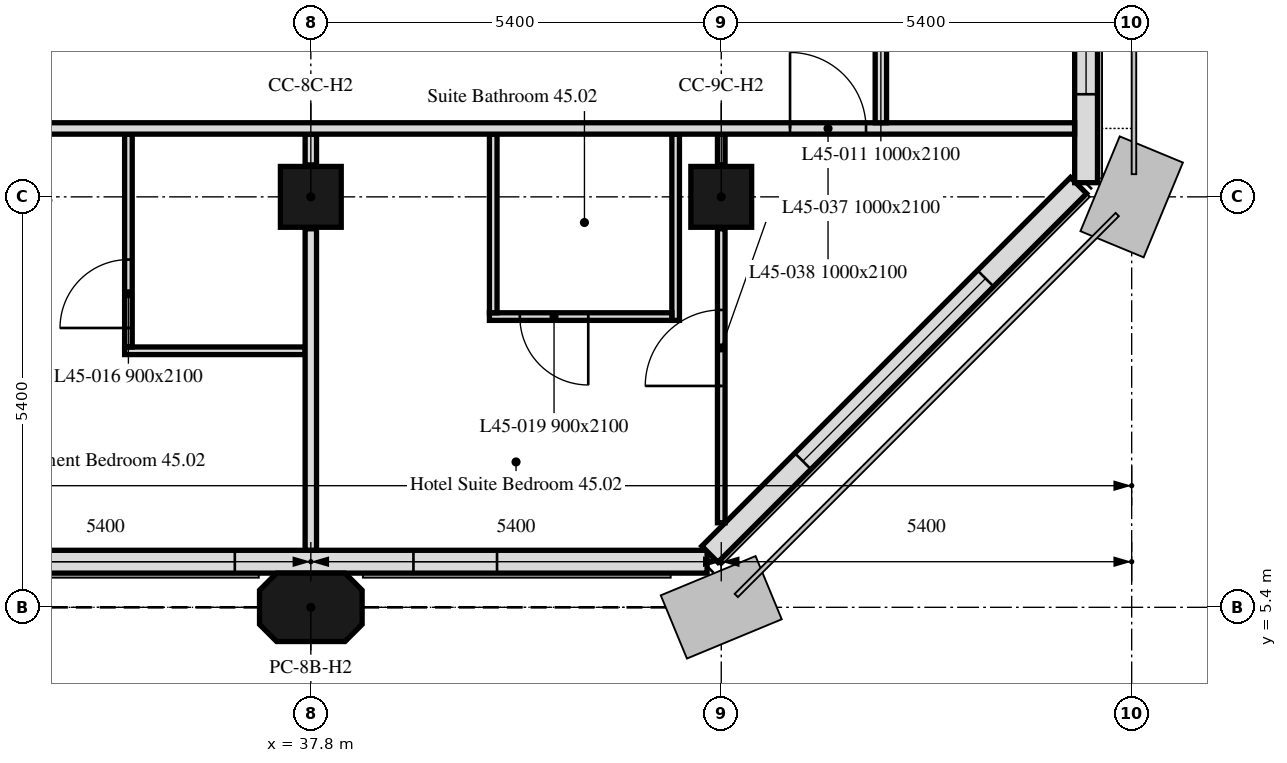
"""IFC4 building model, lengths in metres.
Left out: names, types, materials, properties, quantities, classifications, styles, units other than length and angle.
Written with IfcOpenShell. Run it as: python <this file> out.ifc"""

import sys

from ifc_helpers import new_model, si_unit, direction, frame, frame_2d, origin, origin_2d, place, context, subcontext, project, spatial, polyline, rectangle, outline, extrude, element, fill, save


model = new_model("IFC4")
c1 = context("Model", 3, precision=1e-05, world=origin(), true_north=direction((0.0, 1.0)))
c2 = subcontext(c1, "Body", "Model", "MODEL_VIEW")
j1 = project(units=[si_unit("LENGTHUNIT", "METRE"), si_unit("PLANEANGLEUNIT", "RADIAN")], contexts=[c1])
p1 = place(None, origin())
s1 = spatial("IfcSite", under=j1, at=p1, CompositionType="ELEMENT")
p2 = place(p1, origin())
s2 = spatial("IfcBuilding", under=s1, at=p2, CompositionType="ELEMENT")
p3 = place(p2, frame((0.0, 0.0, 187.3)))
s3 = spatial("IfcBuildingStorey", under=s2, at=p3, CompositionType="ELEMENT", Elevation=187.3)
p4 = place(p3, frame((37.8, 5.4, 0.0), z_axis=(0.0, 0.0, 1.0), x_axis=(1.0, 0.0, 0.0)))
e1 = element("IfcColumn", 1, at=p4, inside=s3, PredefinedType="COLUMN", context=c2, shape_type="SweptSolid", body=[
    extrude(outline(polyline([(-0.45, -0.45), (0.45, -0.45), (0.675, -0.225), (0.675, 0.225), (0.45, 0.45), (-0.45, 0.45), (-0.675, 0.225), (-0.675, -0.225), (-0.45, -0.45)])), origin(), (0.0, 0.0, 1.0), 3.0),
])
for number, where, z_axis, x_axis in (
    (2, (37.8, 10.8, 0.0), (0.0, 0.0, 1.0), (1.0, 0.0, 0.0)),
    (3, (43.2, 10.8, 0.0), (0.0, 0.0, 1.0), (1.0, 0.0, 0.0)),
):
    element("IfcColumn", number, at=place(p3, frame(where, z_axis=z_axis, x_axis=x_axis)), inside=s3, PredefinedType="COLUMN", context=c2, shape_type="SweptSolid", body=[
        extrude(rectangle(XDim=0.8, YDim=0.8, at=origin_2d()), origin(), (0.0, 0.0, 1.0), 3.0),
    ])
p5 = place(p3, frame((10.986, 6.0, 0.0), z_axis=(0.0, 0.0, 1.0), x_axis=(1.0, 0.0, 0.0)))
e4 = element("IfcWall", 4, at=p5, inside=s3, PredefinedType="SOLIDWALL", context=c2, shape_type="SweptSolid", body=[
    extrude(rectangle(XDim=32.027, YDim=0.3, at=frame_2d((16.014, 0.0))), origin(), (0.0, 0.0, 1.0), 3.0),
])
p6 = place(p5, frame((0.814, 0.0, 0.9)))
e5 = element("IfcOpeningElement", 5, at=p6, cuts=e4, PredefinedType="OPENING", context=c2, shape_type="SweptSolid", body=[
    extrude(rectangle(XDim=3.4, YDim=1.7, at=frame_2d((1.7, 0.85))), frame((0.0, 0.16, 0.0), z_axis=(0.0, -1.0, 0.0), x_axis=(1.0, 0.0, 0.0)), (0.0, 0.0, 1.0), 0.32),
])
p7 = place(p5, frame((7.464, 0.0, 0.9)))
e6 = element("IfcOpeningElement", 6, at=p7, cuts=e4, PredefinedType="OPENING", context=c2, shape_type="SweptSolid", body=[
    extrude(rectangle(XDim=1.1, YDim=1.7, at=frame_2d((0.55, 0.85))), frame((0.0, 0.16, 0.0), z_axis=(0.0, -1.0, 0.0), x_axis=(1.0, 0.0, 0.0)), (0.0, 0.0, 1.0), 0.32),
])
p8 = place(p5, frame((11.614, 0.0, 0.9)))
e7 = element("IfcOpeningElement", 7, at=p8, cuts=e4, PredefinedType="OPENING", context=c2, shape_type="SweptSolid", body=[
    extrude(rectangle(XDim=3.4, YDim=1.7, at=frame_2d((1.7, 0.85))), frame((0.0, 0.16, 0.0), z_axis=(0.0, -1.0, 0.0), x_axis=(1.0, 0.0, 0.0)), (0.0, 0.0, 1.0), 0.32),
])
p9 = place(p5, frame((18.264, 0.0, 0.9)))
e8 = element("IfcOpeningElement", 8, at=p9, cuts=e4, PredefinedType="OPENING", context=c2, shape_type="SweptSolid", body=[
    extrude(rectangle(XDim=1.1, YDim=1.7, at=frame_2d((0.55, 0.85))), frame((0.0, 0.16, 0.0), z_axis=(0.0, -1.0, 0.0), x_axis=(1.0, 0.0, 0.0)), (0.0, 0.0, 1.0), 0.32),
])
p10 = place(p5, frame((22.414, 0.0, 0.9)))
e9 = element("IfcOpeningElement", 9, at=p10, cuts=e4, PredefinedType="OPENING", context=c2, shape_type="SweptSolid", body=[
    extrude(rectangle(XDim=3.4, YDim=1.7, at=frame_2d((1.7, 0.85))), frame((0.0, 0.16, 0.0), z_axis=(0.0, -1.0, 0.0), x_axis=(1.0, 0.0, 0.0)), (0.0, 0.0, 1.0), 0.32),
])
p11 = place(p5, frame((28.164, 0.0, 0.9)))
e10 = element("IfcOpeningElement", 10, at=p11, cuts=e4, PredefinedType="OPENING", context=c2, shape_type="SweptSolid", body=[
    extrude(rectangle(XDim=1.1, YDim=1.7, at=frame_2d((0.55, 0.85))), frame((0.0, 0.16, 0.0), z_axis=(0.0, -1.0, 0.0), x_axis=(1.0, 0.0, 0.0)), (0.0, 0.0, 1.0), 0.32),
])
p12 = place(p3, frame((43.051, 6.099, 0.0), z_axis=(0.0, 0.0, 1.0), x_axis=(0.707106781187, 0.707106781187, 0.0)))
e11 = element("IfcWall", 11, at=p12, inside=s3, PredefinedType="SOLIDWALL", context=c2, shape_type="SweptSolid", body=[
    extrude(rectangle(XDim=6.86, YDim=0.3, at=frame_2d((3.43, 0.0))), origin(), (0.0, 0.0, 1.0), 3.0),
])
p13 = place(p12, frame((1.73, 0.0, 0.9)))
e12 = element("IfcOpeningElement", 12, at=p13, cuts=e11, PredefinedType="OPENING", context=c2, shape_type="SweptSolid", body=[
    extrude(rectangle(XDim=3.4, YDim=1.7, at=frame_2d((1.7, 0.85))), frame((0.0, 0.16, 0.0), z_axis=(0.0, -1.0, 0.0), x_axis=(1.0, 0.0, 0.0)), (0.0, 0.0, 1.0), 0.32),
])
p14 = place(p3, frame((48.0, 10.986, 0.0), z_axis=(0.0, 0.0, 1.0), x_axis=(0.0, 1.0, 0.0)))
e13 = element("IfcWall", 13, at=p14, inside=s3, PredefinedType="SOLIDWALL", context=c2, shape_type="SweptSolid", body=[
    extrude(rectangle(XDim=32.027, YDim=0.3, at=frame_2d((16.014, 0.0))), origin(), (0.0, 0.0, 1.0), 3.0),
])
p15 = place(p14, frame((1.164, 0.0, 0.9)))
e14 = element("IfcOpeningElement", 14, at=p15, cuts=e13, PredefinedType="OPENING", context=c2, shape_type="SweptSolid", body=[
    extrude(rectangle(XDim=1.1, YDim=1.7, at=frame_2d((0.55, 0.85))), frame((0.0, 0.16, 0.0), z_axis=(0.0, -1.0, 0.0), x_axis=(1.0, 0.0, 0.0)), (0.0, 0.0, 1.0), 0.32),
])
p16 = place(p14, frame((2.764, 0.0, 0.9)))
e15 = element("IfcOpeningElement", 15, at=p16, cuts=e13, PredefinedType="OPENING", context=c2, shape_type="SweptSolid", body=[
    extrude(rectangle(XDim=1.1, YDim=1.7, at=frame_2d((0.55, 0.85))), frame((0.0, 0.16, 0.0), z_axis=(0.0, -1.0, 0.0), x_axis=(1.0, 0.0, 0.0)), (0.0, 0.0, 1.0), 0.32),
])
p17 = place(p14, frame((6.564, 0.0, 0.9)))
e16 = element("IfcOpeningElement", 16, at=p17, cuts=e13, PredefinedType="OPENING", context=c2, shape_type="SweptSolid", body=[
    extrude(rectangle(XDim=1.1, YDim=1.7, at=frame_2d((0.55, 0.85))), frame((0.0, 0.16, 0.0), z_axis=(0.0, -1.0, 0.0), x_axis=(1.0, 0.0, 0.0)), (0.0, 0.0, 1.0), 0.32),
])
p18 = place(p14, frame((8.164, 0.0, 0.9)))
e17 = element("IfcOpeningElement", 17, at=p18, cuts=e13, PredefinedType="OPENING", context=c2, shape_type="SweptSolid", body=[
    extrude(rectangle(XDim=1.1, YDim=1.7, at=frame_2d((0.55, 0.85))), frame((0.0, 0.16, 0.0), z_axis=(0.0, -1.0, 0.0), x_axis=(1.0, 0.0, 0.0)), (0.0, 0.0, 1.0), 0.32),
])
p19 = place(p14, frame((11.964, 0.0, 0.9)))
e18 = element("IfcOpeningElement", 18, at=p19, cuts=e13, PredefinedType="OPENING", context=c2, shape_type="SweptSolid", body=[
    extrude(rectangle(XDim=1.1, YDim=1.7, at=frame_2d((0.55, 0.85))), frame((0.0, 0.16, 0.0), z_axis=(0.0, -1.0, 0.0), x_axis=(1.0, 0.0, 0.0)), (0.0, 0.0, 1.0), 0.32),
])
p20 = place(p14, frame((13.564, 0.0, 0.9)))
e19 = element("IfcOpeningElement", 19, at=p20, cuts=e13, PredefinedType="OPENING", context=c2, shape_type="SweptSolid", body=[
    extrude(rectangle(XDim=1.1, YDim=1.7, at=frame_2d((0.55, 0.85))), frame((0.0, 0.16, 0.0), z_axis=(0.0, -1.0, 0.0), x_axis=(1.0, 0.0, 0.0)), (0.0, 0.0, 1.0), 0.32),
])
p21 = place(p14, frame((17.364, 0.0, 0.9)))
e20 = element("IfcOpeningElement", 20, at=p21, cuts=e13, PredefinedType="OPENING", context=c2, shape_type="SweptSolid", body=[
    extrude(rectangle(XDim=1.1, YDim=1.7, at=frame_2d((0.55, 0.85))), frame((0.0, 0.16, 0.0), z_axis=(0.0, -1.0, 0.0), x_axis=(1.0, 0.0, 0.0)), (0.0, 0.0, 1.0), 0.32),
])
p22 = place(p14, frame((18.964, 0.0, 0.9)))
e21 = element("IfcOpeningElement", 21, at=p22, cuts=e13, PredefinedType="OPENING", context=c2, shape_type="SweptSolid", body=[
    extrude(rectangle(XDim=1.1, YDim=1.7, at=frame_2d((0.55, 0.85))), frame((0.0, 0.16, 0.0), z_axis=(0.0, -1.0, 0.0), x_axis=(1.0, 0.0, 0.0)), (0.0, 0.0, 1.0), 0.32),
])
p23 = place(p14, frame((22.414, 0.0, 0.9)))
e22 = element("IfcOpeningElement", 22, at=p23, cuts=e13, PredefinedType="OPENING", context=c2, shape_type="SweptSolid", body=[
    extrude(rectangle(XDim=3.4, YDim=1.7, at=frame_2d((1.7, 0.85))), frame((0.0, 0.16, 0.0), z_axis=(0.0, -1.0, 0.0), x_axis=(1.0, 0.0, 0.0)), (0.0, 0.0, 1.0), 0.32),
])
p24 = place(p14, frame((28.164, 0.0, 0.9)))
e23 = element("IfcOpeningElement", 23, at=p24, cuts=e13, PredefinedType="OPENING", context=c2, shape_type="SweptSolid", body=[
    extrude(rectangle(XDim=1.1, YDim=1.7, at=frame_2d((0.55, 0.85))), frame((0.0, 0.16, 0.0), z_axis=(0.0, -1.0, 0.0), x_axis=(1.0, 0.0, 0.0)), (0.0, 0.0, 1.0), 0.32),
])
p25 = place(p14, frame((29.764, 0.0, 0.9)))
e24 = element("IfcOpeningElement", 24, at=p25, cuts=e13, PredefinedType="OPENING", context=c2, shape_type="SweptSolid", body=[
    extrude(rectangle(XDim=1.1, YDim=1.7, at=frame_2d((0.55, 0.85))), frame((0.0, 0.16, 0.0), z_axis=(0.0, -1.0, 0.0), x_axis=(1.0, 0.0, 0.0)), (0.0, 0.0, 1.0), 0.32),
])
p26 = place(p3, frame((37.725, 8.775, 0.0), z_axis=(0.0, 0.0, 1.0), x_axis=(-1.0, 0.0, 0.0)))
e25 = element("IfcWall", 25, at=p26, inside=s3, PredefinedType="PARTITIONING", context=c2, shape_type="SweptSolid", body=[
    extrude(rectangle(XDim=2.375, YDim=0.1, at=frame_2d((1.188, 0.0))), origin(), (0.0, 0.0, 1.0), 3.0),
])
p27 = place(p3, frame((35.4, 8.825, 0.0), z_axis=(0.0, 0.0, 1.0), x_axis=(0.0, 1.0, 0.0)))
e26 = element("IfcWall", 26, at=p27, inside=s3, PredefinedType="PARTITIONING", context=c2, shape_type="SweptSolid", body=[
    extrude(rectangle(XDim=2.8, YDim=0.1, at=frame_2d((1.4, 0.0))), origin(), (0.0, 0.0, 1.0), 3.0),
])
p28 = place(p27, frame((0.25, 0.0, 0.0)))
e27 = element("IfcOpeningElement", 27, at=p28, cuts=e26, PredefinedType="OPENING", context=c2, shape_type="SweptSolid", body=[
    extrude(rectangle(XDim=0.9, YDim=2.1, at=frame_2d((0.45, 1.05))), frame((0.0, 0.05, 0.0), z_axis=(0.0, -1.0, 0.0), x_axis=(1.0, 0.0, 0.0)), (0.0, 0.0, 1.0), 0.1),
])
p29 = place(p3, frame((37.8, 6.151, 0.0), z_axis=(0.0, 0.0, 1.0), x_axis=(0.0, 1.0, 0.0)))
e28 = element("IfcWall", 28, at=p29, inside=s3, PredefinedType="PARTITIONING", context=c2, shape_type="SweptSolid", body=[
    extrude(rectangle(XDim=4.229, YDim=0.15, at=frame_2d((2.115, 0.0))), origin(), (0.0, 0.0, 1.0), 3.0),
])
p30 = place(p3, frame((37.8, 11.22, 0.0), z_axis=(0.0, 0.0, 1.0), x_axis=(0.0, 1.0, 0.0)))
e29 = element("IfcWall", 29, at=p30, inside=s3, PredefinedType="PARTITIONING", context=c2, shape_type="SweptSolid", body=[
    extrude(rectangle(XDim=0.405, YDim=0.15, at=frame_2d((0.203, 0.0))), origin(), (0.0, 0.0, 1.0), 3.0),
])
p31 = place(p3, frame((43.2, 6.512, 0.0), z_axis=(0.0, 0.0, 1.0), x_axis=(0.0, 1.0, 0.0)))
e30 = element("IfcWall", 30, at=p31, inside=s3, PredefinedType="PARTITIONING", context=c2, shape_type="SweptSolid", body=[
    extrude(rectangle(XDim=3.868, YDim=0.1, at=frame_2d((1.934, 0.0))), origin(), (0.0, 0.0, 1.0), 3.0),
])
p32 = place(p31, frame((1.8, 0.0, 0.0)))
e31 = element("IfcOpeningElement", 31, at=p32, cuts=e30, PredefinedType="OPENING", context=c2, shape_type="SweptSolid", body=[
    extrude(rectangle(XDim=1.0, YDim=2.1, at=frame_2d((0.5, 1.05))), frame((0.0, 0.05, 0.0), z_axis=(0.0, -1.0, 0.0), x_axis=(1.0, 0.0, 0.0)), (0.0, 0.0, 1.0), 0.1),
])
p33 = place(p3, frame((43.2, 11.22, 0.0), z_axis=(0.0, 0.0, 1.0), x_axis=(0.0, 1.0, 0.0)))
e32 = element("IfcWall", 32, at=p33, inside=s3, PredefinedType="PARTITIONING", context=c2, shape_type="SweptSolid", body=[
    extrude(rectangle(XDim=0.405, YDim=0.1, at=frame_2d((0.203, 0.0))), origin(), (0.0, 0.0, 1.0), 3.0),
])
p34 = place(p3, frame((42.6, 11.625, 0.0), z_axis=(0.0, 0.0, 1.0), x_axis=(0.0, -1.0, 0.0)))
e33 = element("IfcWall", 33, at=p34, inside=s3, PredefinedType="PARTITIONING", context=c2, shape_type="SweptSolid", body=[
    extrude(rectangle(XDim=2.45, YDim=0.1, at=frame_2d((1.225, 0.0))), origin(), (0.0, 0.0, 1.0), 3.0),
])
p35 = place(p3, frame((42.55, 9.225, 0.0), z_axis=(0.0, 0.0, 1.0), x_axis=(-1.0, 0.0, 0.0)))
e34 = element("IfcWall", 34, at=p35, inside=s3, PredefinedType="PARTITIONING", context=c2, shape_type="SweptSolid", body=[
    extrude(rectangle(XDim=2.4, YDim=0.1, at=frame_2d((1.2, 0.0))), origin(), (0.0, 0.0, 1.0), 3.0),
])
p36 = place(p35, frame((1.1, 0.0, 0.0)))
e35 = element("IfcOpeningElement", 35, at=p36, cuts=e34, PredefinedType="OPENING", context=c2, shape_type="SweptSolid", body=[
    extrude(rectangle(XDim=0.9, YDim=2.1, at=frame_2d((0.45, 1.05))), frame((0.0, 0.05, 0.0), z_axis=(0.0, -1.0, 0.0), x_axis=(1.0, 0.0, 0.0)), (0.0, 0.0, 1.0), 0.1),
])
p37 = place(p3, frame((40.2, 9.275, 0.0), z_axis=(0.0, 0.0, 1.0), x_axis=(0.0, 1.0, 0.0)))
e36 = element("IfcWall", 36, at=p37, inside=s3, PredefinedType="PARTITIONING", context=c2, shape_type="SweptSolid", body=[
    extrude(rectangle(XDim=2.35, YDim=0.1, at=frame_2d((1.175, 0.0))), origin(), (0.0, 0.0, 1.0), 3.0),
])
p38 = place(p3, frame((6.151, 11.7, 0.0), z_axis=(0.0, 0.0, 1.0), x_axis=(1.0, 0.0, 0.0)))
e37 = element("IfcWall", 37, at=p38, inside=s3, PredefinedType="PARTITIONING", context=c2, shape_type="SweptSolid", body=[
    extrude(rectangle(XDim=41.698, YDim=0.15, at=frame_2d((20.849, 0.0))), origin(), (0.0, 0.0, 1.0), 3.0),
])
p39 = place(p38, frame((1.449, 0.0, 0.0)))
e38 = element("IfcOpeningElement", 38, at=p39, cuts=e37, PredefinedType="OPENING", context=c2, shape_type="SweptSolid", body=[
    extrude(rectangle(XDim=1.0, YDim=2.1, at=frame_2d((0.5, 1.05))), frame((0.0, 0.075, 0.0), z_axis=(0.0, -1.0, 0.0), x_axis=(1.0, 0.0, 0.0)), (0.0, 0.0, 1.0), 0.15),
])
p40 = place(p38, frame((37.954, 0.0, 0.0)))
e39 = element("IfcOpeningElement", 39, at=p40, cuts=e37, PredefinedType="OPENING", context=c2, shape_type="SweptSolid", body=[
    extrude(rectangle(XDim=1.0, YDim=2.1, at=frame_2d((0.5, 1.05))), frame((0.0, 0.075, 0.0), z_axis=(0.0, -1.0, 0.0), x_axis=(1.0, 0.0, 0.0)), (0.0, 0.0, 1.0), 0.15),
])
p41 = place(p38, frame((12.449, 0.0, 0.0)))
e40 = element("IfcOpeningElement", 40, at=p41, cuts=e37, PredefinedType="OPENING", context=c2, shape_type="SweptSolid", body=[
    extrude(rectangle(XDim=1.0, YDim=2.1, at=frame_2d((0.5, 1.05))), frame((0.0, 0.075, 0.0), z_axis=(0.0, -1.0, 0.0), x_axis=(1.0, 0.0, 0.0)), (0.0, 0.0, 1.0), 0.15),
])
p42 = place(p38, frame((23.249, 0.0, 0.0)))
e41 = element("IfcOpeningElement", 41, at=p42, cuts=e37, PredefinedType="OPENING", context=c2, shape_type="SweptSolid", body=[
    extrude(rectangle(XDim=1.0, YDim=2.1, at=frame_2d((0.5, 1.05))), frame((0.0, 0.075, 0.0), z_axis=(0.0, -1.0, 0.0), x_axis=(1.0, 0.0, 0.0)), (0.0, 0.0, 1.0), 0.15),
])
p43 = place(p3, frame((45.3, 40.425, 0.0), z_axis=(0.0, 0.0, 1.0), x_axis=(0.0, -1.0, 0.0)))
e42 = element("IfcWall", 42, at=p43, inside=s3, PredefinedType="PARTITIONING", context=c2, shape_type="SweptSolid", body=[
    extrude(rectangle(XDim=28.65, YDim=0.15, at=frame_2d((14.325, 0.0))), origin(), (0.0, 0.0, 1.0), 2.4),
])
p44 = place(p43, frame((10.225, 0.0, 0.0)))
e43 = element("IfcOpeningElement", 43, at=p44, cuts=e42, PredefinedType="OPENING", context=c2, shape_type="SweptSolid", body=[
    extrude(rectangle(XDim=1.0, YDim=2.1, at=frame_2d((0.5, 1.05))), frame((0.0, 0.075, 0.0), z_axis=(0.0, -1.0, 0.0), x_axis=(1.0, 0.0, 0.0)), (0.0, 0.0, 1.0), 0.15),
])
p45 = place(p43, frame((25.975, 0.0, 0.0)))
e44 = element("IfcOpeningElement", 44, at=p45, cuts=e42, PredefinedType="OPENING", context=c2, shape_type="SweptSolid", body=[
    extrude(rectangle(XDim=1.0, YDim=2.1, at=frame_2d((0.5, 1.05))), frame((0.0, 0.075, 0.0), z_axis=(0.0, -1.0, 0.0), x_axis=(1.0, 0.0, 0.0)), (0.0, 0.0, 1.0), 0.15),
])
p46 = place(p43, frame((4.825, 0.0, 0.0)))
e45 = element("IfcOpeningElement", 45, at=p46, cuts=e42, PredefinedType="OPENING", context=c2, shape_type="SweptSolid", body=[
    extrude(rectangle(XDim=1.0, YDim=2.1, at=frame_2d((0.5, 1.05))), frame((0.0, 0.075, 0.0), z_axis=(0.0, -1.0, 0.0), x_axis=(1.0, 0.0, 0.0)), (0.0, 0.0, 1.0), 0.15),
])
p47 = place(p43, frame((19.675, 0.0, 0.0)))
e46 = element("IfcOpeningElement", 46, at=p47, cuts=e42, PredefinedType="OPENING", context=c2, shape_type="SweptSolid", body=[
    extrude(rectangle(XDim=1.0, YDim=2.1, at=frame_2d((0.5, 1.05))), frame((0.0, 0.075, 0.0), z_axis=(0.0, -1.0, 0.0), x_axis=(1.0, 0.0, 0.0)), (0.0, 0.0, 1.0), 0.15),
])
p48 = place(p10, origin())
e47 = element("IfcWindow", 47, at=p48, inside=s3, PartitioningType="SINGLE_PANEL", PredefinedType="WINDOW", context=c2, shape_type="SweptSolid", body=[
    extrude(rectangle(XDim=3.4, YDim=1.7, at=frame_2d((1.7, 0.85))), frame((0.0, 0.03, 0.0), z_axis=(0.0, -1.0, 0.0), x_axis=(1.0, 0.0, 0.0)), (0.0, 0.0, 1.0), 0.06),
])
fill(e9, e47)
p49 = place(p11, origin())
e48 = element("IfcWindow", 48, at=p49, inside=s3, PartitioningType="SINGLE_PANEL", PredefinedType="WINDOW", context=c2, shape_type="SweptSolid", body=[
    extrude(rectangle(XDim=1.1, YDim=1.7, at=frame_2d((0.55, 0.85))), frame((0.0, 0.03, 0.0), z_axis=(0.0, -1.0, 0.0), x_axis=(1.0, 0.0, 0.0)), (0.0, 0.0, 1.0), 0.06),
])
fill(e10, e48)
p50 = place(p13, origin())
e49 = element("IfcWindow", 49, at=p50, inside=s3, PartitioningType="SINGLE_PANEL", PredefinedType="WINDOW", context=c2, shape_type="SweptSolid", body=[
    extrude(rectangle(XDim=3.4, YDim=1.7, at=frame_2d((1.7, 0.85))), frame((0.0, 0.03, 0.0), z_axis=(0.0, -1.0, 0.0), x_axis=(1.0, 0.0, 0.0)), (0.0, 0.0, 1.0), 0.06),
])
fill(e12, e49)
p51 = place(p15, origin())
e50 = element("IfcWindow", 50, at=p51, inside=s3, PartitioningType="SINGLE_PANEL", PredefinedType="WINDOW", context=c2, shape_type="SweptSolid", body=[
    extrude(rectangle(XDim=1.1, YDim=1.7, at=frame_2d((0.55, 0.85))), frame((0.0, 0.03, 0.0), z_axis=(0.0, -1.0, 0.0), x_axis=(1.0, 0.0, 0.0)), (0.0, 0.0, 1.0), 0.06),
])
fill(e14, e50)
p52 = place(p28, origin())
e51 = element("IfcDoor", 51, at=p52, inside=s3, OperationType="SINGLE_SWING_RIGHT", PredefinedType="DOOR", context=c2, shape_type="SweptSolid", body=[
    extrude(rectangle(XDim=0.9, YDim=2.1, at=frame_2d((0.45, 1.05))), frame((0.0, 0.025, 0.0), z_axis=(0.0, -1.0, 0.0), x_axis=(1.0, 0.0, 0.0)), (0.0, 0.0, 1.0), 0.05),
])
fill(e27, e51)
p53 = place(p36, origin())
e52 = element("IfcDoor", 52, at=p53, inside=s3, OperationType="SINGLE_SWING_LEFT", PredefinedType="DOOR", context=c2, shape_type="SweptSolid", body=[
    extrude(rectangle(XDim=0.9, YDim=2.1, at=frame_2d((0.45, 1.05))), frame((0.0, 0.025, 0.0), z_axis=(0.0, -1.0, 0.0), x_axis=(1.0, 0.0, 0.0)), (0.0, 0.0, 1.0), 0.05),
])
fill(e35, e52)
p54 = place(p32, origin())
e53 = element("IfcDoor", 53, at=p54, inside=s3, OperationType="SINGLE_SWING_LEFT", PredefinedType="DOOR", context=c2, shape_type="SweptSolid", body=[
    extrude(rectangle(XDim=1.0, YDim=2.1, at=frame_2d((0.5, 1.05))), frame((0.0, 0.025, 0.0), z_axis=(0.0, -1.0, 0.0), x_axis=(1.0, 0.0, 0.0)), (0.0, 0.0, 1.0), 0.05),
])
fill(e31, e53)
p55 = place(p40, origin())
e54 = element("IfcDoor", 54, at=p55, inside=s3, OperationType="SINGLE_SWING_LEFT", PredefinedType="DOOR", context=c2, shape_type="SweptSolid", body=[
    extrude(rectangle(XDim=1.0, YDim=2.1, at=frame_2d((0.5, 1.05))), frame((0.0, 0.025, 0.0), z_axis=(0.0, -1.0, 0.0), x_axis=(1.0, 0.0, 0.0)), (0.0, 0.0, 1.0), 0.05),
])
fill(e39, e54)
save(model, sys.argv[1])
